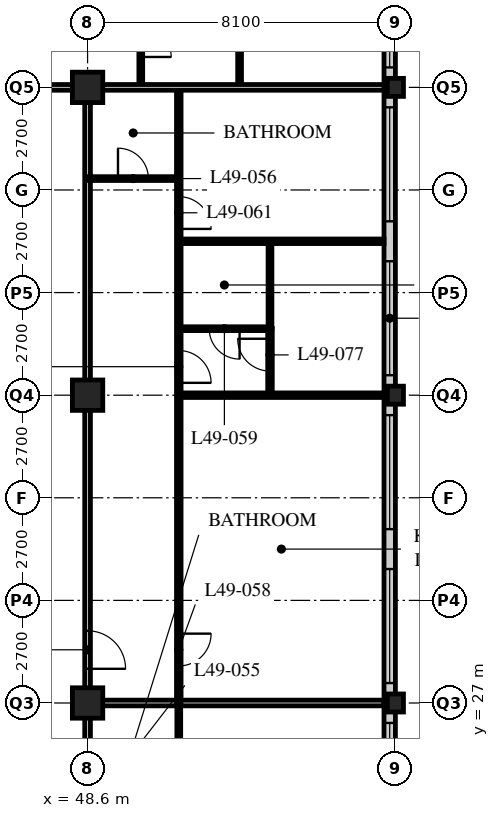
"""IFC4 building model, lengths in metres.
Left out: names, types, materials, properties, quantities, classifications, styles, units other than length and angle.
Written with IfcOpenShell. Run it as: python <this file> out.ifc"""

import sys

from ifc_helpers import new_model, si_unit, direction, frame, frame_2d, origin, origin_2d, place, context, subcontext, project, spatial, rectangle, hollow_rectangle, i_section, extrude, element, fill, save


model = new_model("IFC4")
c1 = context("Model", 3, precision=1e-05, world=origin(), true_north=direction((0.0, 1.0)))
c2 = subcontext(c1, "Body", "Model", "MODEL_VIEW")
j1 = project(units=[si_unit("LENGTHUNIT", "METRE"), si_unit("PLANEANGLEUNIT", "RADIAN")], contexts=[c1])
p1 = place(None, origin())
s1 = spatial("IfcSite", under=j1, at=p1, CompositionType="ELEMENT")
p2 = place(p1, origin())
s2 = spatial("IfcBuilding", under=s1, at=p2, CompositionType="ELEMENT")
p3 = place(p2, frame((0.0, 0.0, 192.0)))
s3 = spatial("IfcBuildingStorey", under=s2, at=p3, CompositionType="ELEMENT", Elevation=192.0)
for number, where, z_axis, x_axis in (
    (1, (48.6, 27.0, 0.0), (0.0, 0.0, 1.0), (1.0, 0.0, 0.0)),
    (2, (48.6, 35.1, 0.0), (0.0, 0.0, 1.0), (1.0, 0.0, 0.0)),
    (3, (48.6, 43.2, 0.0), (0.0, 0.0, 1.0), (1.0, 0.0, 0.0)),
):
    element("IfcColumn", number, at=place(p3, frame(where, z_axis=z_axis, x_axis=x_axis)), inside=s3, PredefinedType="COLUMN", context=c2, shape_type="SweptSolid", body=[
        extrude(hollow_rectangle(XDim=0.8, YDim=0.8, WallThickness=0.08, at=origin_2d()), origin(), (0.0, 0.0, 1.0), 3.6),
    ])
for number, where, z_axis, x_axis in (
    (4, (56.7, 27.0, 0.0), (0.0, 0.0, 1.0), (1.0, 0.0, 0.0)),
    (5, (56.7, 35.1, 0.0), (0.0, 0.0, 1.0), (1.0, 0.0, 0.0)),
    (6, (56.7, 43.2, 0.0), (0.0, 0.0, 1.0), (1.0, 0.0, 0.0)),
):
    element("IfcColumn", number, at=place(p3, frame(where, z_axis=z_axis, x_axis=x_axis)), inside=s3, PredefinedType="COLUMN", context=c2, shape_type="SweptSolid", body=[
        extrude(i_section(OverallWidth=0.424, OverallDepth=0.475, WebThickness=0.048, FlangeThickness=0.077, FilletRadius=0.015, at=origin_2d()), origin(), (0.0, 0.0, 1.0), 3.6),
    ])
p4 = place(p3, frame((56.55, 19.2, 0.0), z_axis=(0.0, 0.0, 1.0), x_axis=(0.0, 1.0, 0.0)))
e7 = element("IfcWall", 7, at=p4, inside=s3, PredefinedType="SOLIDWALL", context=c2, shape_type="SweptSolid", body=[
    extrude(rectangle(XDim=32.1, YDim=0.3, at=frame_2d((16.05, 0.0))), origin(), (0.0, 0.0, 1.0), 3.39),
])
p5 = place(p4, frame((0.225, 0.0, 0.6)))
e8 = element("IfcOpeningElement", 8, at=p5, cuts=e7, PredefinedType="OPENING", context=c2, shape_type="SweptSolid", body=[
    extrude(rectangle(XDim=3.0, YDim=2.4, at=frame_2d((1.5, 1.2))), frame((0.0, 0.16, 0.0), z_axis=(0.0, -1.0, 0.0), x_axis=(1.0, 0.0, 0.0)), (0.0, 0.0, 1.0), 0.32),
])
p6 = place(p4, frame((4.275, 0.0, 0.6)))
e9 = element("IfcOpeningElement", 9, at=p6, cuts=e7, PredefinedType="OPENING", context=c2, shape_type="SweptSolid", body=[
    extrude(rectangle(XDim=3.0, YDim=2.4, at=frame_2d((1.5, 1.2))), frame((0.0, 0.16, 0.0), z_axis=(0.0, -1.0, 0.0), x_axis=(1.0, 0.0, 0.0)), (0.0, 0.0, 1.0), 0.32),
])
p7 = place(p4, frame((8.325, 0.0, 0.6)))
e10 = element("IfcOpeningElement", 10, at=p7, cuts=e7, PredefinedType="OPENING", context=c2, shape_type="SweptSolid", body=[
    extrude(rectangle(XDim=3.0, YDim=2.4, at=frame_2d((1.5, 1.2))), frame((0.0, 0.16, 0.0), z_axis=(0.0, -1.0, 0.0), x_axis=(1.0, 0.0, 0.0)), (0.0, 0.0, 1.0), 0.32),
])
p8 = place(p4, frame((12.375, 0.0, 0.6)))
e11 = element("IfcOpeningElement", 11, at=p8, cuts=e7, PredefinedType="OPENING", context=c2, shape_type="SweptSolid", body=[
    extrude(rectangle(XDim=3.0, YDim=2.4, at=frame_2d((1.5, 1.2))), frame((0.0, 0.16, 0.0), z_axis=(0.0, -1.0, 0.0), x_axis=(1.0, 0.0, 0.0)), (0.0, 0.0, 1.0), 0.32),
])
p9 = place(p4, frame((16.425, 0.0, 0.6)))
e12 = element("IfcOpeningElement", 12, at=p9, cuts=e7, PredefinedType="OPENING", context=c2, shape_type="SweptSolid", body=[
    extrude(rectangle(XDim=3.0, YDim=2.4, at=frame_2d((1.5, 1.2))), frame((0.0, 0.16, 0.0), z_axis=(0.0, -1.0, 0.0), x_axis=(1.0, 0.0, 0.0)), (0.0, 0.0, 1.0), 0.32),
])
p10 = place(p4, frame((20.475, 0.0, 0.6)))
e13 = element("IfcOpeningElement", 13, at=p10, cuts=e7, PredefinedType="OPENING", context=c2, shape_type="SweptSolid", body=[
    extrude(rectangle(XDim=3.0, YDim=2.4, at=frame_2d((1.5, 1.2))), frame((0.0, 0.16, 0.0), z_axis=(0.0, -1.0, 0.0), x_axis=(1.0, 0.0, 0.0)), (0.0, 0.0, 1.0), 0.32),
])
p11 = place(p4, frame((24.525, 0.0, 0.6)))
e14 = element("IfcOpeningElement", 14, at=p11, cuts=e7, PredefinedType="OPENING", context=c2, shape_type="SweptSolid", body=[
    extrude(rectangle(XDim=3.0, YDim=2.4, at=frame_2d((1.5, 1.2))), frame((0.0, 0.16, 0.0), z_axis=(0.0, -1.0, 0.0), x_axis=(1.0, 0.0, 0.0)), (0.0, 0.0, 1.0), 0.32),
])
p12 = place(p4, frame((28.575, 0.0, 0.6)))
e15 = element("IfcOpeningElement", 15, at=p12, cuts=e7, PredefinedType="OPENING", context=c2, shape_type="SweptSolid", body=[
    extrude(rectangle(XDim=3.0, YDim=2.4, at=frame_2d((1.5, 1.2))), frame((0.0, 0.16, 0.0), z_axis=(0.0, -1.0, 0.0), x_axis=(1.0, 0.0, 0.0)), (0.0, 0.0, 1.0), 0.32),
])
p13 = place(p3, frame((8.1, 43.2, 0.0), z_axis=(0.0, 0.0, 1.0), x_axis=(1.0, 0.0, 0.0)))
e16 = element("IfcWall", 16, at=p13, inside=s3, PredefinedType="PARTITIONING", context=c2, shape_type="SweptSolid", body=[
    extrude(rectangle(XDim=40.5, YDim=0.15, at=frame_2d((20.25, 0.0))), origin(), (0.0, 0.0, 1.0), 2.778),
])
p14 = place(p13, frame((4.45, 0.0, 0.0)))
e17 = element("IfcOpeningElement", 17, at=p14, cuts=e16, PredefinedType="OPENING", context=c2, shape_type="SweptSolid", body=[
    extrude(rectangle(XDim=1.0, YDim=2.1, at=frame_2d((0.5, 1.05))), frame((0.0, 0.085, 0.0), z_axis=(0.0, -1.0, 0.0), x_axis=(1.0, 0.0, 0.0)), (0.0, 0.0, 1.0), 0.17),
])
p15 = place(p13, frame((20.65, 0.0, 0.0)))
e18 = element("IfcOpeningElement", 18, at=p15, cuts=e16, PredefinedType="OPENING", context=c2, shape_type="SweptSolid", body=[
    extrude(rectangle(XDim=1.0, YDim=2.1, at=frame_2d((0.5, 1.05))), frame((0.0, 0.085, 0.0), z_axis=(0.0, -1.0, 0.0), x_axis=(1.0, 0.0, 0.0)), (0.0, 0.0, 1.0), 0.17),
])
p16 = place(p13, frame((28.75, 0.0, 0.0)))
e19 = element("IfcOpeningElement", 19, at=p16, cuts=e16, PredefinedType="OPENING", context=c2, shape_type="SweptSolid", body=[
    extrude(rectangle(XDim=1.0, YDim=2.1, at=frame_2d((0.5, 1.05))), frame((0.0, 0.085, 0.0), z_axis=(0.0, -1.0, 0.0), x_axis=(1.0, 0.0, 0.0)), (0.0, 0.0, 1.0), 0.17),
])
p17 = place(p13, frame((37.975, 0.0, 0.0)))
e20 = element("IfcOpeningElement", 20, at=p17, cuts=e16, PredefinedType="OPENING", context=c2, shape_type="SweptSolid", body=[
    extrude(rectangle(XDim=1.0, YDim=2.1, at=frame_2d((0.5, 1.05))), frame((0.0, 0.085, 0.0), z_axis=(0.0, -1.0, 0.0), x_axis=(1.0, 0.0, 0.0)), (0.0, 0.0, 1.0), 0.17),
])
p18 = place(p13, frame((1.525, 0.0, 0.0)))
e21 = element("IfcOpeningElement", 21, at=p18, cuts=e16, PredefinedType="OPENING", context=c2, shape_type="SweptSolid", body=[
    extrude(rectangle(XDim=1.0, YDim=2.1, at=frame_2d((0.5, 1.05))), frame((0.0, 0.085, 0.0), z_axis=(0.0, -1.0, 0.0), x_axis=(1.0, 0.0, 0.0)), (0.0, 0.0, 1.0), 0.17),
])
p19 = place(p3, frame((48.6, 18.9, 0.0), z_axis=(0.0, 0.0, 1.0), x_axis=(0.0, 1.0, 0.0)))
e22 = element("IfcWall", 22, at=p19, inside=s3, PredefinedType="PARTITIONING", context=c2, shape_type="SweptSolid", body=[
    extrude(rectangle(XDim=24.3, YDim=0.15, at=frame_2d((12.15, 0.0))), origin(), (0.0, 0.0, 1.0), 2.778),
])
p20 = place(p19, frame((2.35, 0.0, 0.0)))
e23 = element("IfcOpeningElement", 23, at=p20, cuts=e22, PredefinedType="OPENING", context=c2, shape_type="SweptSolid", body=[
    extrude(rectangle(XDim=1.0, YDim=2.1, at=frame_2d((0.5, 1.05))), frame((0.0, 0.085, 0.0), z_axis=(0.0, -1.0, 0.0), x_axis=(1.0, 0.0, 0.0)), (0.0, 0.0, 1.0), 0.17),
])
p21 = place(p19, frame((4.75, 0.0, 0.0)))
e24 = element("IfcOpeningElement", 24, at=p21, cuts=e22, PredefinedType="OPENING", context=c2, shape_type="SweptSolid", body=[
    extrude(rectangle(XDim=1.0, YDim=2.1, at=frame_2d((0.5, 1.05))), frame((0.0, 0.085, 0.0), z_axis=(0.0, -1.0, 0.0), x_axis=(1.0, 0.0, 0.0)), (0.0, 0.0, 1.0), 0.17),
])
p22 = place(p19, frame((9.0, 0.0, 0.0)))
e25 = element("IfcOpeningElement", 25, at=p22, cuts=e22, PredefinedType="OPENING", context=c2, shape_type="SweptSolid", body=[
    extrude(rectangle(XDim=1.0, YDim=2.1, at=frame_2d((0.5, 1.05))), frame((0.0, 0.085, 0.0), z_axis=(0.0, -1.0, 0.0), x_axis=(1.0, 0.0, 0.0)), (0.0, 0.0, 1.0), 0.17),
])
p23 = place(p3, frame((51.0, 24.8, 0.0), z_axis=(0.0, 0.0, 1.0), x_axis=(0.0, 1.0, 0.0)))
e26 = element("IfcWall", 26, at=p23, inside=s3, PredefinedType="PARTITIONING", context=c2, shape_type="SweptSolid", body=[
    extrude(rectangle(XDim=2.2, YDim=0.1, at=frame_2d((1.1, 0.0))), origin(), (0.0, 0.0, 1.0), 3.39),
])
p24 = place(p3, frame((48.6, 27.0, 0.0), z_axis=(0.0, 0.0, 1.0), x_axis=(1.0, 0.0, 0.0)))
e27 = element("IfcWall", 27, at=p24, inside=s3, PredefinedType="PARTITIONING", context=c2, shape_type="SweptSolid", body=[
    extrude(rectangle(XDim=7.8, YDim=0.15, at=frame_2d((3.9, 0.0))), origin(), (0.0, 0.0, 1.0), 2.778),
])
p25 = place(p3, frame((51.0, 27.0, 0.0), z_axis=(0.0, 0.0, 1.0), x_axis=(0.0, 1.0, 0.0)))
e28 = element("IfcWall", 28, at=p25, inside=s3, PredefinedType="PARTITIONING", context=c2, shape_type="SweptSolid", body=[
    extrude(rectangle(XDim=16.2, YDim=0.12, at=frame_2d((8.1, 0.0))), origin(), (0.0, 0.0, 1.0), 3.39),
])
p26 = place(p25, frame((0.975, 0.0, 0.0)))
e29 = element("IfcOpeningElement", 29, at=p26, cuts=e28, PredefinedType="OPENING", context=c2, shape_type="SweptSolid", body=[
    extrude(rectangle(XDim=0.85, YDim=2.1, at=frame_2d((0.425, 1.05))), frame((0.0, 0.07, 0.0), z_axis=(0.0, -1.0, 0.0), x_axis=(1.0, 0.0, 0.0)), (0.0, 0.0, 1.0), 0.14),
])
p27 = place(p25, frame((8.425, 0.0, 0.0)))
e30 = element("IfcOpeningElement", 30, at=p27, cuts=e28, PredefinedType="OPENING", context=c2, shape_type="SweptSolid", body=[
    extrude(rectangle(XDim=0.85, YDim=2.1, at=frame_2d((0.425, 1.05))), frame((0.0, 0.07, 0.0), z_axis=(0.0, -1.0, 0.0), x_axis=(1.0, 0.0, 0.0)), (0.0, 0.0, 1.0), 0.14),
])
p28 = place(p25, frame((12.475, 0.0, 0.0)))
e31 = element("IfcOpeningElement", 31, at=p28, cuts=e28, PredefinedType="OPENING", context=c2, shape_type="SweptSolid", body=[
    extrude(rectangle(XDim=0.85, YDim=2.1, at=frame_2d((0.425, 1.05))), frame((0.0, 0.07, 0.0), z_axis=(0.0, -1.0, 0.0), x_axis=(1.0, 0.0, 0.0)), (0.0, 0.0, 1.0), 0.14),
])
p29 = place(p3, frame((48.6, 40.8, 0.0), z_axis=(0.0, 0.0, 1.0), x_axis=(1.0, 0.0, 0.0)))
e32 = element("IfcWall", 32, at=p29, inside=s3, PredefinedType="PARTITIONING", context=c2, shape_type="SweptSolid", body=[
    extrude(rectangle(XDim=2.4, YDim=0.1, at=frame_2d((1.2, 0.0))), origin(), (0.0, 0.0, 1.0), 3.39),
])
p30 = place(p29, frame((0.8, 0.0, 0.0)))
e33 = element("IfcOpeningElement", 33, at=p30, cuts=e32, PredefinedType="OPENING", context=c2, shape_type="SweptSolid", body=[
    extrude(rectangle(XDim=0.8, YDim=2.1, at=frame_2d((0.4, 1.05))), frame((0.0, 0.06, 0.0), z_axis=(0.0, -1.0, 0.0), x_axis=(1.0, 0.0, 0.0)), (0.0, 0.0, 1.0), 0.12),
])
p31 = place(p3, frame((51.0, 36.85, 0.0), z_axis=(0.0, 0.0, 1.0), x_axis=(1.0, 0.0, 0.0)))
e34 = element("IfcWall", 34, at=p31, inside=s3, PredefinedType="PARTITIONING", context=c2, shape_type="SweptSolid", body=[
    extrude(rectangle(XDim=2.4, YDim=0.1, at=frame_2d((1.2, 0.0))), origin(), (0.0, 0.0, 1.0), 3.39),
])
p32 = place(p31, frame((0.8, 0.0, 0.0)))
e35 = element("IfcOpeningElement", 35, at=p32, cuts=e34, PredefinedType="OPENING", context=c2, shape_type="SweptSolid", body=[
    extrude(rectangle(XDim=0.8, YDim=2.1, at=frame_2d((0.4, 1.05))), frame((0.0, 0.06, 0.0), z_axis=(0.0, -1.0, 0.0), x_axis=(1.0, 0.0, 0.0)), (0.0, 0.0, 1.0), 0.12),
])
p33 = place(p3, frame((53.4, 36.85, 0.0), z_axis=(0.0, 0.0, 1.0), x_axis=(0.0, 1.0, 0.0)))
e36 = element("IfcWall", 36, at=p33, inside=s3, PredefinedType="PARTITIONING", context=c2, shape_type="SweptSolid", body=[
    extrude(rectangle(XDim=2.3, YDim=0.1, at=frame_2d((1.15, 0.0))), origin(), (0.0, 0.0, 1.0), 3.39),
])
p34 = place(p3, frame((51.0, 35.1, 0.0), z_axis=(0.0, 0.0, 1.0), x_axis=(1.0, 0.0, 0.0)))
e37 = element("IfcWall", 37, at=p34, inside=s3, PredefinedType="PARTITIONING", context=c2, shape_type="SweptSolid", body=[
    extrude(rectangle(XDim=5.4, YDim=0.12, at=frame_2d((2.7, 0.0))), origin(), (0.0, 0.0, 1.0), 2.778),
])
p35 = place(p3, frame((51.0, 39.15, 0.0), z_axis=(0.0, 0.0, 1.0), x_axis=(1.0, 0.0, 0.0)))
e38 = element("IfcWall", 38, at=p35, inside=s3, PredefinedType="PARTITIONING", context=c2, shape_type="SweptSolid", body=[
    extrude(rectangle(XDim=5.4, YDim=0.12, at=frame_2d((2.7, 0.0))), origin(), (0.0, 0.0, 1.0), 3.39),
])
p36 = place(p3, frame((50.0, 43.2, 0.0), z_axis=(0.0, 0.0, 1.0), x_axis=(0.0, 1.0, 0.0)))
e39 = element("IfcWall", 39, at=p36, inside=s3, PredefinedType="PARTITIONING", context=c2, shape_type="SweptSolid", body=[
    extrude(rectangle(XDim=2.4, YDim=0.1, at=frame_2d((1.2, 0.0))), origin(), (0.0, 0.0, 1.0), 3.39),
])
p37 = place(p36, frame((0.8, 0.0, 0.0)))
e40 = element("IfcOpeningElement", 40, at=p37, cuts=e39, PredefinedType="OPENING", context=c2, shape_type="SweptSolid", body=[
    extrude(rectangle(XDim=0.8, YDim=2.1, at=frame_2d((0.4, 1.05))), frame((0.0, 0.06, 0.0), z_axis=(0.0, -1.0, 0.0), x_axis=(1.0, 0.0, 0.0)), (0.0, 0.0, 1.0), 0.12),
])
p38 = place(p3, frame((52.6, 43.2, 0.0), z_axis=(0.0, 0.0, 1.0), x_axis=(0.0, 1.0, 0.0)))
e41 = element("IfcWall", 41, at=p38, inside=s3, PredefinedType="PARTITIONING", context=c2, shape_type="SweptSolid", body=[
    extrude(rectangle(XDim=2.4, YDim=0.1, at=frame_2d((1.2, 0.0))), origin(), (0.0, 0.0, 1.0), 3.39),
])
p39 = place(p3, frame((48.6, 43.2, 0.0), z_axis=(0.0, 0.0, 1.0), x_axis=(1.0, 0.0, 0.0)))
e42 = element("IfcWall", 42, at=p39, inside=s3, PredefinedType="PARTITIONING", context=c2, shape_type="SweptSolid", body=[
    extrude(rectangle(XDim=7.8, YDim=0.15, at=frame_2d((3.9, 0.0))), origin(), (0.0, 0.0, 1.0), 2.778),
])
p40 = place(p3, frame((53.4, 36.86, 0.0), z_axis=(0.0, 0.0, 1.0), x_axis=(0.0, -1.0, 0.0)))
e43 = element("IfcWall", 43, at=p40, inside=s3, PredefinedType="PARTITIONING", context=c2, shape_type="SweptSolid", body=[
    extrude(rectangle(XDim=1.76, YDim=0.12, at=frame_2d((0.88, 0.0))), origin(), (0.0, 0.0, 1.0), 3.39),
])
p41 = place(p40, frame((0.275, 0.0, 0.0)))
e44 = element("IfcOpeningElement", 44, at=p41, cuts=e43, PredefinedType="OPENING", context=c2, shape_type="SweptSolid", body=[
    extrude(rectangle(XDim=0.85, YDim=2.1, at=frame_2d((0.425, 1.05))), frame((0.0, 0.07, 0.0), z_axis=(0.0, -1.0, 0.0), x_axis=(1.0, 0.0, 0.0)), (0.0, 0.0, 1.0), 0.14),
])
p42 = place(p6, origin())
e45 = element("IfcWindow", 45, at=p42, inside=s3, PartitioningType="SINGLE_PANEL", PredefinedType="WINDOW", context=c2, shape_type="SweptSolid", body=[
    extrude(rectangle(XDim=3.0, YDim=2.4, at=frame_2d((1.5, 1.2))), frame((0.0, 0.03, 0.0), z_axis=(0.0, -1.0, 0.0), x_axis=(1.0, 0.0, 0.0)), (0.0, 0.0, 1.0), 0.06),
])
fill(e9, e45)
p43 = place(p7, origin())
e46 = element("IfcWindow", 46, at=p43, inside=s3, PartitioningType="SINGLE_PANEL", PredefinedType="WINDOW", context=c2, shape_type="SweptSolid", body=[
    extrude(rectangle(XDim=3.0, YDim=2.4, at=frame_2d((1.5, 1.2))), frame((0.0, 0.03, 0.0), z_axis=(0.0, -1.0, 0.0), x_axis=(1.0, 0.0, 0.0)), (0.0, 0.0, 1.0), 0.06),
])
fill(e10, e46)
p44 = place(p8, origin())
e47 = element("IfcWindow", 47, at=p44, inside=s3, PartitioningType="SINGLE_PANEL", PredefinedType="WINDOW", context=c2, shape_type="SweptSolid", body=[
    extrude(rectangle(XDim=3.0, YDim=2.4, at=frame_2d((1.5, 1.2))), frame((0.0, 0.03, 0.0), z_axis=(0.0, -1.0, 0.0), x_axis=(1.0, 0.0, 0.0)), (0.0, 0.0, 1.0), 0.06),
])
fill(e11, e47)
p45 = place(p9, origin())
e48 = element("IfcWindow", 48, at=p45, inside=s3, PartitioningType="SINGLE_PANEL", PredefinedType="WINDOW", context=c2, shape_type="SweptSolid", body=[
    extrude(rectangle(XDim=3.0, YDim=2.4, at=frame_2d((1.5, 1.2))), frame((0.0, 0.03, 0.0), z_axis=(0.0, -1.0, 0.0), x_axis=(1.0, 0.0, 0.0)), (0.0, 0.0, 1.0), 0.06),
])
fill(e12, e48)
p46 = place(p10, origin())
e49 = element("IfcWindow", 49, at=p46, inside=s3, PartitioningType="SINGLE_PANEL", PredefinedType="WINDOW", context=c2, shape_type="SweptSolid", body=[
    extrude(rectangle(XDim=3.0, YDim=2.4, at=frame_2d((1.5, 1.2))), frame((0.0, 0.03, 0.0), z_axis=(0.0, -1.0, 0.0), x_axis=(1.0, 0.0, 0.0)), (0.0, 0.0, 1.0), 0.06),
])
fill(e13, e49)
p47 = place(p11, origin())
e50 = element("IfcWindow", 50, at=p47, inside=s3, PartitioningType="SINGLE_PANEL", PredefinedType="WINDOW", context=c2, shape_type="SweptSolid", body=[
    extrude(rectangle(XDim=3.0, YDim=2.4, at=frame_2d((1.5, 1.2))), frame((0.0, 0.03, 0.0), z_axis=(0.0, -1.0, 0.0), x_axis=(1.0, 0.0, 0.0)), (0.0, 0.0, 1.0), 0.06),
])
fill(e14, e50)
p48 = place(p30, origin())
e51 = element("IfcDoor", 51, at=p48, inside=s3, OperationType="SINGLE_SWING_LEFT", PredefinedType="DOOR", context=c2, shape_type="SweptSolid", body=[
    extrude(rectangle(XDim=0.8, YDim=2.1, at=frame_2d((0.4, 1.05))), frame((0.0, 0.025, 0.0), z_axis=(0.0, -1.0, 0.0), x_axis=(1.0, 0.0, 0.0)), (0.0, 0.0, 1.0), 0.05),
])
fill(e33, e51)
p49 = place(p22, origin())
e52 = element("IfcDoor", 52, at=p49, inside=s3, OperationType="SINGLE_SWING_RIGHT", PredefinedType="DOOR", context=c2, shape_type="SweptSolid", body=[
    extrude(rectangle(XDim=1.0, YDim=2.1, at=frame_2d((0.5, 1.05))), frame((0.0, 0.025, 0.0), z_axis=(0.0, -1.0, 0.0), x_axis=(1.0, 0.0, 0.0)), (0.0, 0.0, 1.0), 0.05),
])
fill(e25, e52)
p50 = place(p26, origin())
e53 = element("IfcDoor", 53, at=p50, inside=s3, OperationType="SINGLE_SWING_LEFT", PredefinedType="DOOR", context=c2, shape_type="SweptSolid", body=[
    extrude(rectangle(XDim=0.85, YDim=2.1, at=frame_2d((0.425, 1.05))), frame((0.0, 0.025, 0.0), z_axis=(0.0, -1.0, 0.0), x_axis=(1.0, 0.0, 0.0)), (0.0, 0.0, 1.0), 0.05),
])
fill(e29, e53)
p51 = place(p32, origin())
e54 = element("IfcDoor", 54, at=p51, inside=s3, OperationType="SINGLE_SWING_LEFT", PredefinedType="DOOR", context=c2, shape_type="SweptSolid", body=[
    extrude(rectangle(XDim=0.8, YDim=2.1, at=frame_2d((0.4, 1.05))), frame((0.0, 0.025, 0.0), z_axis=(0.0, -1.0, 0.0), x_axis=(1.0, 0.0, 0.0)), (0.0, 0.0, 1.0), 0.05),
])
fill(e35, e54)
p52 = place(p27, origin())
e55 = element("IfcDoor", 55, at=p52, inside=s3, OperationType="SINGLE_SWING_RIGHT", PredefinedType="DOOR", context=c2, shape_type="SweptSolid", body=[
    extrude(rectangle(XDim=0.85, YDim=2.1, at=frame_2d((0.425, 1.05))), frame((0.0, 0.025, 0.0), z_axis=(0.0, -1.0, 0.0), x_axis=(1.0, 0.0, 0.0)), (0.0, 0.0, 1.0), 0.05),
])
fill(e30, e55)
p53 = place(p28, origin())
e56 = element("IfcDoor", 56, at=p53, inside=s3, OperationType="SINGLE_SWING_RIGHT", PredefinedType="DOOR", context=c2, shape_type="SweptSolid", body=[
    extrude(rectangle(XDim=0.85, YDim=2.1, at=frame_2d((0.425, 1.05))), frame((0.0, 0.025, 0.0), z_axis=(0.0, -1.0, 0.0), x_axis=(1.0, 0.0, 0.0)), (0.0, 0.0, 1.0), 0.05),
])
fill(e31, e56)
p54 = place(p37, origin())
e57 = element("IfcDoor", 57, at=p54, inside=s3, OperationType="SINGLE_SWING_RIGHT", PredefinedType="DOOR", context=c2, shape_type="SweptSolid", body=[
    extrude(rectangle(XDim=0.8, YDim=2.1, at=frame_2d((0.4, 1.05))), frame((0.0, 0.025, 0.0), z_axis=(0.0, -1.0, 0.0), x_axis=(1.0, 0.0, 0.0)), (0.0, 0.0, 1.0), 0.05),
])
fill(e40, e57)
p55 = place(p41, origin())
e58 = element("IfcDoor", 58, at=p55, inside=s3, OperationType="SINGLE_SWING_RIGHT", PredefinedType="DOOR", context=c2, shape_type="SweptSolid", body=[
    extrude(rectangle(XDim=0.85, YDim=2.1, at=frame_2d((0.425, 1.05))), frame((0.0, 0.025, 0.0), z_axis=(0.0, -1.0, 0.0), x_axis=(1.0, 0.0, 0.0)), (0.0, 0.0, 1.0), 0.05),
])
fill(e44, e58)
save(model, sys.argv[1])
